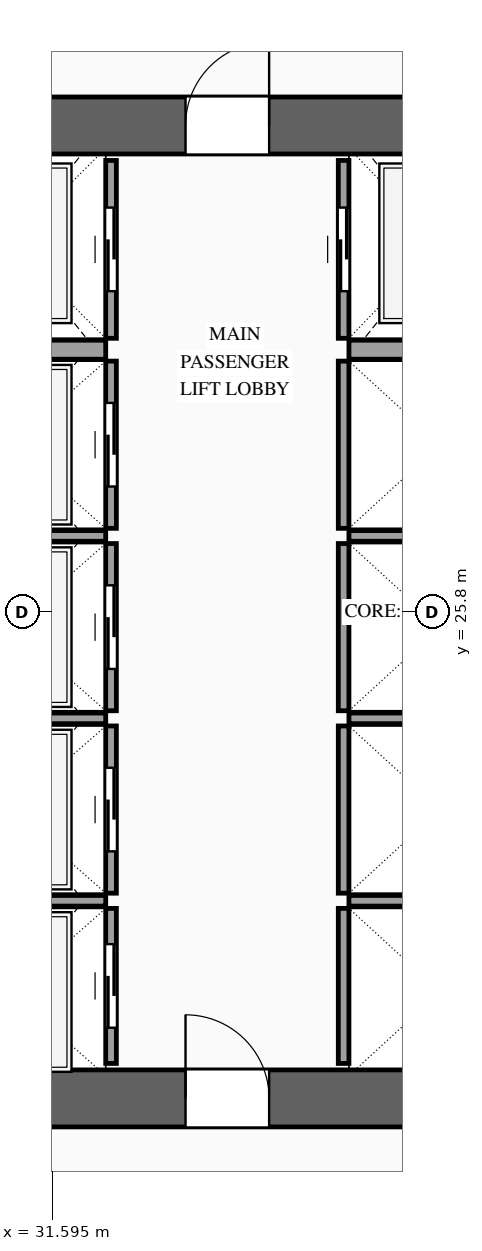
"""IFC4 building model, lengths in metres.
Left out: names, types, materials, properties, quantities, classifications, styles, units other than length and angle.
Written with IfcOpenShell. Run it as: python <this file> out.ifc"""

import sys

from ifc_helpers import new_model, si_unit, direction, frame, frame_2d, origin, place, context, subcontext, project, spatial, rectangle, extrude, source, transform, mapped, element, fill, save


model = new_model("IFC4")
c1 = context("Model", 3, precision=1e-05, world=origin(), true_north=direction((0.0, 1.0)))
c2 = subcontext(c1, "Body", "Model", "MODEL_VIEW")
j1 = project(units=[si_unit("LENGTHUNIT", "METRE"), si_unit("PLANEANGLEUNIT", "RADIAN")], contexts=[c1])
p1 = place(None, origin())
s1 = spatial("IfcSite", under=j1, at=p1, CompositionType="ELEMENT")
p2 = place(p1, origin())
s2 = spatial("IfcBuilding", under=s1, at=p2, CompositionType="ELEMENT")
p3 = place(p2, frame((0.0, 0.0, 93.8)))
s3 = spatial("IfcBuildingStorey", under=s2, at=p3, CompositionType="ELEMENT", Elevation=93.8)
p4 = place(p3, frame((23.425, 19.4, 0.0), z_axis=(0.0, 0.0, 1.0), x_axis=(1.0, 0.0, 0.0)))
e1 = element("IfcWall", 1, at=p4, inside=s3, PredefinedType="SHEAR", context=c2, shape_type="SweptSolid", body=[
    extrude(rectangle(XDim=27.15, YDim=0.75, at=frame_2d((13.575, 0.0))), origin(), (0.0, 0.0, 1.0), 3.6),
])
p5 = place(p4, frame((2.025, 0.0, 0.0)))
e2 = element("IfcOpeningElement", 2, at=p5, cuts=e1, PredefinedType="OPENING", context=c2, shape_type="SweptSolid", body=[
    extrude(rectangle(XDim=1.1, YDim=2.2, at=frame_2d((0.55, 1.1))), frame((0.0, 0.39, 0.0), z_axis=(0.0, -1.0, 0.0), x_axis=(1.0, 0.0, 0.0)), (0.0, 0.0, 1.0), 0.78),
])
p6 = place(p4, frame((9.925, 0.0, 0.0)))
e3 = element("IfcOpeningElement", 3, at=p6, cuts=e1, PredefinedType="OPENING", context=c2, shape_type="SweptSolid", body=[
    extrude(rectangle(XDim=1.1, YDim=2.2, at=frame_2d((0.55, 1.1))), frame((0.0, 0.39, 0.0), z_axis=(0.0, -1.0, 0.0), x_axis=(1.0, 0.0, 0.0)), (0.0, 0.0, 1.0), 0.78),
])
p7 = place(p4, frame((23.125, 0.0, 0.0)))
e4 = element("IfcOpeningElement", 4, at=p7, cuts=e1, PredefinedType="OPENING", context=c2, shape_type="SweptSolid", body=[
    extrude(rectangle(XDim=1.1, YDim=2.2, at=frame_2d((0.55, 1.1))), frame((0.0, 0.39, 0.0), z_axis=(0.0, -1.0, 0.0), x_axis=(1.0, 0.0, 0.0)), (0.0, 0.0, 1.0), 0.78),
])
p8 = place(p4, frame((19.745, 0.0, 0.0)))
e5 = element("IfcOpeningElement", 5, at=p8, cuts=e1, PredefinedType="OPENING", context=c2, shape_type="SweptSolid", body=[
    extrude(rectangle(XDim=0.9, YDim=2.15, at=frame_2d((0.45, 1.075))), frame((0.0, 0.39, 0.0), z_axis=(0.0, -1.0, 0.0), x_axis=(1.0, 0.0, 0.0)), (0.0, 0.0, 1.0), 0.78),
])
p9 = place(p4, frame((18.305, 0.0, 0.0)))
e6 = element("IfcOpeningElement", 6, at=p9, cuts=e1, PredefinedType="OPENING", context=c2, shape_type="SweptSolid", body=[
    extrude(rectangle(XDim=0.9, YDim=2.15, at=frame_2d((0.45, 1.075))), frame((0.0, 0.39, 0.0), z_axis=(0.0, -1.0, 0.0), x_axis=(1.0, 0.0, 0.0)), (0.0, 0.0, 1.0), 0.78),
])
p10 = place(p3, frame((23.425, 32.2, 0.0), z_axis=(0.0, 0.0, 1.0), x_axis=(1.0, 0.0, 0.0)))
e7 = element("IfcWall", 7, at=p10, inside=s3, PredefinedType="SHEAR", context=c2, shape_type="SweptSolid", body=[
    extrude(rectangle(XDim=27.15, YDim=0.75, at=frame_2d((13.575, 0.0))), origin(), (0.0, 0.0, 1.0), 3.6),
])
p11 = place(p10, frame((4.645, 0.0, 0.0)))
e8 = element("IfcOpeningElement", 8, at=p11, cuts=e7, PredefinedType="OPENING", context=c2, shape_type="SweptSolid", body=[
    extrude(rectangle(XDim=0.9, YDim=2.15, at=frame_2d((0.45, 1.075))), frame((0.0, 0.39, 0.0), z_axis=(0.0, -1.0, 0.0), x_axis=(1.0, 0.0, 0.0)), (0.0, 0.0, 1.0), 0.78),
])
p12 = place(p10, frame((9.925, 0.0, 0.0)))
e9 = element("IfcOpeningElement", 9, at=p12, cuts=e7, PredefinedType="OPENING", context=c2, shape_type="SweptSolid", body=[
    extrude(rectangle(XDim=1.1, YDim=2.2, at=frame_2d((0.55, 1.1))), frame((0.0, 0.39, 0.0), z_axis=(0.0, -1.0, 0.0), x_axis=(1.0, 0.0, 0.0)), (0.0, 0.0, 1.0), 0.78),
])
p13 = place(p10, frame((15.775, 0.0, 0.0)))
e10 = element("IfcOpeningElement", 10, at=p13, cuts=e7, PredefinedType="OPENING", context=c2, shape_type="SweptSolid", body=[
    extrude(rectangle(XDim=1.1, YDim=2.2, at=frame_2d((0.55, 1.1))), frame((0.0, 0.39, 0.0), z_axis=(0.0, -1.0, 0.0), x_axis=(1.0, 0.0, 0.0)), (0.0, 0.0, 1.0), 0.78),
])
p14 = place(p10, frame((18.975, 0.0, 0.0)))
e11 = element("IfcOpeningElement", 11, at=p14, cuts=e7, PredefinedType="OPENING", context=c2, shape_type="SweptSolid", body=[
    extrude(rectangle(XDim=0.9, YDim=2.15, at=frame_2d((0.45, 1.075))), frame((0.0, 0.39, 0.0), z_axis=(0.0, -1.0, 0.0), x_axis=(1.0, 0.0, 0.0)), (0.0, 0.0, 1.0), 0.78),
])
p15 = place(p3, frame((32.37, 19.86, 0.0), z_axis=(0.0, 0.0, 1.0), x_axis=(0.0, 1.0, 0.0)))
e12 = element("IfcWall", 12, at=p15, inside=s3, PredefinedType="SOLIDWALL", context=c2, shape_type="SweptSolid", body=[
    extrude(rectangle(XDim=2.04, YDim=0.14, at=frame_2d((1.02, 0.0))), origin(), (0.0, 0.0, 1.0), 3.38),
])
p16 = place(p15, frame((0.47, 0.0, 0.0)))
e13 = element("IfcOpeningElement", 13, at=p16, cuts=e12, PredefinedType="OPENING", context=c2, shape_type="SweptSolid", body=[
    extrude(rectangle(XDim=1.1, YDim=2.2, at=frame_2d((0.55, 1.1))), frame((0.0, 0.085, 0.0), z_axis=(0.0, -1.0, 0.0), x_axis=(1.0, 0.0, 0.0)), (0.0, 0.0, 1.0), 0.17),
])
m1 = source(origin(), c2, "Body", "SweptSolid", [
    extrude(rectangle(XDim=2.5, YDim=0.14, at=frame_2d((1.25, 0.0))), origin(), (0.0, 0.0, 1.0), 3.38),
])
p17 = place(p3, frame((29.8, 22.0, 0.0), z_axis=(0.0, 0.0, 1.0), x_axis=(1.0, 0.0, 0.0)))
e14 = element("IfcWall", 14, at=p17, inside=s3, PredefinedType="SOLIDWALL", context=c2, shape_type="MappedRepresentation", body=[
    mapped(m1, transform((0.0, 0.0, 0.0), scale=1.0)),
])
p18 = place(p3, frame((32.37, 22.1, 0.0), z_axis=(0.0, 0.0, 1.0), x_axis=(0.0, 1.0, 0.0)))
e15 = element("IfcWall", 15, at=p18, inside=s3, PredefinedType="SOLIDWALL", context=c2, shape_type="SweptSolid", body=[
    extrude(rectangle(XDim=2.2, YDim=0.14, at=frame_2d((1.1, 0.0))), origin(), (0.0, 0.0, 1.0), 3.38),
])
p19 = place(p18, frame((0.55, 0.0, 0.0)))
e16 = element("IfcOpeningElement", 16, at=p19, cuts=e15, PredefinedType="OPENING", context=c2, shape_type="SweptSolid", body=[
    extrude(rectangle(XDim=1.1, YDim=2.2, at=frame_2d((0.55, 1.1))), frame((0.0, 0.085, 0.0), z_axis=(0.0, -1.0, 0.0), x_axis=(1.0, 0.0, 0.0)), (0.0, 0.0, 1.0), 0.17),
])
p20 = place(p3, frame((29.8, 24.4, 0.0), z_axis=(0.0, 0.0, 1.0), x_axis=(1.0, 0.0, 0.0)))
e17 = element("IfcWall", 17, at=p20, inside=s3, PredefinedType="SOLIDWALL", context=c2, shape_type="MappedRepresentation", body=[
    mapped(m1, transform((0.0, 0.0, 0.0), scale=1.0)),
])
p21 = place(p3, frame((32.37, 24.5, 0.0), z_axis=(0.0, 0.0, 1.0), x_axis=(0.0, 1.0, 0.0)))
e18 = element("IfcWall", 18, at=p21, inside=s3, PredefinedType="SOLIDWALL", context=c2, shape_type="SweptSolid", body=[
    extrude(rectangle(XDim=2.2, YDim=0.14, at=frame_2d((1.1, 0.0))), origin(), (0.0, 0.0, 1.0), 3.38),
])
p22 = place(p21, frame((0.55, 0.0, 0.0)))
e19 = element("IfcOpeningElement", 19, at=p22, cuts=e18, PredefinedType="OPENING", context=c2, shape_type="SweptSolid", body=[
    extrude(rectangle(XDim=1.1, YDim=2.2, at=frame_2d((0.55, 1.1))), frame((0.0, 0.085, 0.0), z_axis=(0.0, -1.0, 0.0), x_axis=(1.0, 0.0, 0.0)), (0.0, 0.0, 1.0), 0.17),
])
p23 = place(p3, frame((29.8, 26.8, 0.0), z_axis=(0.0, 0.0, 1.0), x_axis=(1.0, 0.0, 0.0)))
e20 = element("IfcWall", 20, at=p23, inside=s3, PredefinedType="SOLIDWALL", context=c2, shape_type="MappedRepresentation", body=[
    mapped(m1, transform((0.0, 0.0, 0.0), scale=1.0)),
])
p24 = place(p3, frame((32.37, 26.9, 0.0), z_axis=(0.0, 0.0, 1.0), x_axis=(0.0, 1.0, 0.0)))
e21 = element("IfcWall", 21, at=p24, inside=s3, PredefinedType="SOLIDWALL", context=c2, shape_type="SweptSolid", body=[
    extrude(rectangle(XDim=2.2, YDim=0.14, at=frame_2d((1.1, 0.0))), origin(), (0.0, 0.0, 1.0), 3.38),
])
p25 = place(p24, frame((0.55, 0.0, 0.0)))
e22 = element("IfcOpeningElement", 22, at=p25, cuts=e21, PredefinedType="OPENING", context=c2, shape_type="SweptSolid", body=[
    extrude(rectangle(XDim=1.1, YDim=2.2, at=frame_2d((0.55, 1.1))), frame((0.0, 0.085, 0.0), z_axis=(0.0, -1.0, 0.0), x_axis=(1.0, 0.0, 0.0)), (0.0, 0.0, 1.0), 0.17),
])
p26 = place(p3, frame((32.37, 29.4, 0.0), z_axis=(0.0, 0.0, 1.0), x_axis=(0.0, 1.0, 0.0)))
e23 = element("IfcWall", 23, at=p26, inside=s3, PredefinedType="SOLIDWALL", context=c2, shape_type="SweptSolid", body=[
    extrude(rectangle(XDim=2.34, YDim=0.14, at=frame_2d((1.17, 0.0))), origin(), (0.0, 0.0, 1.0), 3.38),
])
p27 = place(p26, frame((0.62, 0.0, 0.0)))
e24 = element("IfcOpeningElement", 24, at=p27, cuts=e23, PredefinedType="OPENING", context=c2, shape_type="SweptSolid", body=[
    extrude(rectangle(XDim=1.1, YDim=2.2, at=frame_2d((0.55, 1.1))), frame((0.0, 0.085, 0.0), z_axis=(0.0, -1.0, 0.0), x_axis=(1.0, 0.0, 0.0)), (0.0, 0.0, 1.0), 0.17),
])
m2 = source(origin(), c2, "Body", "SweptSolid", [
    extrude(rectangle(XDim=2.5, YDim=0.25, at=frame_2d((1.25, 0.0))), origin(), (0.0, 0.0, 1.0), 3.38),
])
p28 = place(p3, frame((29.8, 29.25, 0.0), z_axis=(0.0, 0.0, 1.0), x_axis=(1.0, 0.0, 0.0)))
e25 = element("IfcWall", 25, at=p28, inside=s3, PredefinedType="SOLIDWALL", context=c2, shape_type="MappedRepresentation", body=[
    mapped(m2, transform((0.0, 0.0, 0.0), scale=1.0)),
])
m3 = source(origin(), c2, "Body", "SweptSolid", [
    extrude(rectangle(XDim=2.04, YDim=0.14, at=frame_2d((1.02, 0.0))), origin(), (0.0, 0.0, 1.0), 3.38),
])
p29 = place(p3, frame((35.43, 19.86, 0.0), z_axis=(0.0, 0.0, 1.0), x_axis=(0.0, 1.0, 0.0)))
e26 = element("IfcWall", 26, at=p29, inside=s3, PredefinedType="SOLIDWALL", context=c2, shape_type="MappedRepresentation", body=[
    mapped(m3, transform((0.0, 0.0, 0.0), scale=1.0)),
])
m4 = source(origin(), c2, "Body", "SweptSolid", [
    extrude(rectangle(XDim=2.4, YDim=0.14, at=frame_2d((1.2, 0.0))), origin(), (0.0, 0.0, 1.0), 3.38),
])
p30 = place(p3, frame((35.5, 22.0, 0.0), z_axis=(0.0, 0.0, 1.0), x_axis=(1.0, 0.0, 0.0)))
e27 = element("IfcWall", 27, at=p30, inside=s3, PredefinedType="SOLIDWALL", context=c2, shape_type="MappedRepresentation", body=[
    mapped(m4, transform((0.0, 0.0, 0.0), scale=1.0)),
])
m5 = source(origin(), c2, "Body", "SweptSolid", [
    extrude(rectangle(XDim=2.2, YDim=0.14, at=frame_2d((1.1, 0.0))), origin(), (0.0, 0.0, 1.0), 3.38),
])
p31 = place(p3, frame((35.43, 22.1, 0.0), z_axis=(0.0, 0.0, 1.0), x_axis=(0.0, 1.0, 0.0)))
e28 = element("IfcWall", 28, at=p31, inside=s3, PredefinedType="SOLIDWALL", context=c2, shape_type="MappedRepresentation", body=[
    mapped(m5, transform((0.0, 0.0, 0.0), scale=1.0)),
])
p32 = place(p3, frame((35.5, 24.4, 0.0), z_axis=(0.0, 0.0, 1.0), x_axis=(1.0, 0.0, 0.0)))
e29 = element("IfcWall", 29, at=p32, inside=s3, PredefinedType="SOLIDWALL", context=c2, shape_type="MappedRepresentation", body=[
    mapped(m4, transform((0.0, 0.0, 0.0), scale=1.0)),
])
p33 = place(p3, frame((35.43, 24.5, 0.0), z_axis=(0.0, 0.0, 1.0), x_axis=(0.0, 1.0, 0.0)))
e30 = element("IfcWall", 30, at=p33, inside=s3, PredefinedType="SOLIDWALL", context=c2, shape_type="MappedRepresentation", body=[
    mapped(m5, transform((0.0, 0.0, 0.0), scale=1.0)),
])
p34 = place(p3, frame((35.5, 26.8, 0.0), z_axis=(0.0, 0.0, 1.0), x_axis=(1.0, 0.0, 0.0)))
e31 = element("IfcWall", 31, at=p34, inside=s3, PredefinedType="SOLIDWALL", context=c2, shape_type="MappedRepresentation", body=[
    mapped(m4, transform((0.0, 0.0, 0.0), scale=1.0)),
])
m6 = source(origin(), c2, "Body", "SweptSolid", [
    extrude(rectangle(XDim=2.2, YDim=0.14, at=frame_2d((1.1, 0.0))), origin(), (0.0, 0.0, 1.0), 3.38),
])
p35 = place(p3, frame((35.43, 26.9, 0.0), z_axis=(0.0, 0.0, 1.0), x_axis=(0.0, 1.0, 0.0)))
e32 = element("IfcWall", 32, at=p35, inside=s3, PredefinedType="SOLIDWALL", context=c2, shape_type="MappedRepresentation", body=[
    mapped(m6, transform((0.0, 0.0, 0.0), scale=1.0)),
])
p36 = place(p3, frame((35.43, 29.4, 0.0), z_axis=(0.0, 0.0, 1.0), x_axis=(0.0, 1.0, 0.0)))
e33 = element("IfcWall", 33, at=p36, inside=s3, PredefinedType="SOLIDWALL", context=c2, shape_type="SweptSolid", body=[
    extrude(rectangle(XDim=2.34, YDim=0.14, at=frame_2d((1.17, 0.0))), origin(), (0.0, 0.0, 1.0), 3.38),
])
p37 = place(p36, frame((0.62, 0.0, 0.0)))
e34 = element("IfcOpeningElement", 34, at=p37, cuts=e33, PredefinedType="OPENING", context=c2, shape_type="SweptSolid", body=[
    extrude(rectangle(XDim=1.1, YDim=2.2, at=frame_2d((0.55, 1.1))), frame((0.0, 0.085, 0.0), z_axis=(0.0, -1.0, 0.0), x_axis=(1.0, 0.0, 0.0)), (0.0, 0.0, 1.0), 0.17),
])
m7 = source(origin(), c2, "Body", "SweptSolid", [
    extrude(rectangle(XDim=2.4, YDim=0.25, at=frame_2d((1.2, 0.0))), origin(), (0.0, 0.0, 1.0), 3.38),
])
p38 = place(p3, frame((35.5, 29.25, 0.0), z_axis=(0.0, 0.0, 1.0), x_axis=(1.0, 0.0, 0.0)))
e35 = element("IfcWall", 35, at=p38, inside=s3, PredefinedType="SOLIDWALL", context=c2, shape_type="MappedRepresentation", body=[
    mapped(m7, transform((0.0, 0.0, 0.0), scale=1.0)),
])
m8 = source(origin(), c2, "Body", "SweptSolid", [
    extrude(rectangle(XDim=1.1, YDim=2.2, at=frame_2d((0.55, 1.1))), frame((0.0, 0.025, 0.0), z_axis=(0.0, -1.0, 0.0), x_axis=(1.0, 0.0, 0.0)), (0.0, 0.0, 1.0), 0.05),
])
p39 = place(p16, origin())
e36 = element("IfcDoor", 36, at=p39, inside=s3, OperationType="SLIDING_TO_LEFT", PredefinedType="DOOR", context=c2, shape_type="MappedRepresentation", body=[
    mapped(m8, transform((0.0, 0.0, 0.0), scale=1.0)),
])
fill(e13, e36)
p40 = place(p19, origin())
e37 = element("IfcDoor", 37, at=p40, inside=s3, OperationType="SLIDING_TO_RIGHT", PredefinedType="DOOR", context=c2, shape_type="MappedRepresentation", body=[
    mapped(m8, transform((0.0, 0.0, 0.0), scale=1.0)),
])
fill(e16, e37)
p41 = place(p22, origin())
e38 = element("IfcDoor", 38, at=p41, inside=s3, OperationType="SLIDING_TO_LEFT", PredefinedType="DOOR", context=c2, shape_type="MappedRepresentation", body=[
    mapped(m8, transform((0.0, 0.0, 0.0), scale=1.0)),
])
fill(e19, e38)
p42 = place(p25, origin())
e39 = element("IfcDoor", 39, at=p42, inside=s3, OperationType="SLIDING_TO_RIGHT", PredefinedType="DOOR", context=c2, shape_type="MappedRepresentation", body=[
    mapped(m8, transform((0.0, 0.0, 0.0), scale=1.0)),
])
fill(e22, e39)
p43 = place(p27, origin())
e40 = element("IfcDoor", 40, at=p43, inside=s3, OperationType="SLIDING_TO_LEFT", PredefinedType="DOOR", context=c2, shape_type="MappedRepresentation", body=[
    mapped(m8, transform((0.0, 0.0, 0.0), scale=1.0)),
])
fill(e24, e40)
p44 = place(p37, origin())
e41 = element("IfcDoor", 41, at=p44, inside=s3, OperationType="SLIDING_TO_RIGHT", PredefinedType="DOOR", context=c2, shape_type="MappedRepresentation", body=[
    mapped(m8, transform((0.0, 0.0, 0.0), scale=1.0)),
])
fill(e34, e41)
m9 = source(origin(), c2, "Body", "SweptSolid", [
    extrude(rectangle(XDim=1.1, YDim=2.2, at=frame_2d((0.55, 1.1))), frame((0.0, 0.025, 0.0), z_axis=(0.0, -1.0, 0.0), x_axis=(1.0, 0.0, 0.0)), (0.0, 0.0, 1.0), 0.05),
])
p45 = place(p6, origin())
e42 = element("IfcDoor", 42, at=p45, inside=s3, OperationType="SINGLE_SWING_LEFT", PredefinedType="DOOR", context=c2, shape_type="MappedRepresentation", body=[
    mapped(m9, transform((0.0, 0.0, 0.0), scale=1.0)),
])
fill(e3, e42)
p46 = place(p12, origin())
e43 = element("IfcDoor", 43, at=p46, inside=s3, OperationType="SINGLE_SWING_RIGHT", PredefinedType="DOOR", context=c2, shape_type="MappedRepresentation", body=[
    mapped(m9, transform((0.0, 0.0, 0.0), scale=1.0)),
])
fill(e9, e43)
save(model, sys.argv[1])
